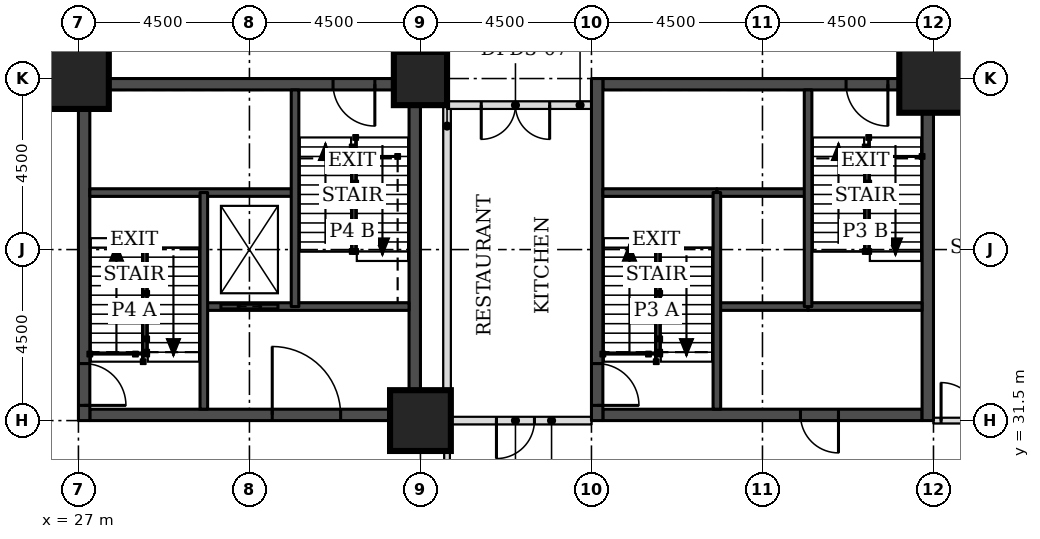
"""IFC4 building model, lengths in metres.
Left out: names, types, materials, properties, quantities, classifications, styles, units other than length and angle.
Written with IfcOpenShell. Run it as: python <this file> out.ifc"""

import sys

from ifc_helpers import new_model, si_unit, direction, frame, frame_2d, origin, origin_2d, place, context, subcontext, project, spatial, rectangle, extrude, element, fill, save


model = new_model("IFC4")
c1 = context("Model", 3, precision=1e-05, world=origin(), true_north=direction((0.0, 1.0)))
c2 = subcontext(c1, "Body", "Model", "MODEL_VIEW")
j1 = project(units=[si_unit("LENGTHUNIT", "METRE"), si_unit("PLANEANGLEUNIT", "RADIAN")], contexts=[c1])
p1 = place(None, origin())
s1 = spatial("IfcSite", under=j1, at=p1, CompositionType="ELEMENT")
p2 = place(p1, origin())
s2 = spatial("IfcBuilding", under=s1, at=p2, CompositionType="ELEMENT")
p3 = place(p2, frame((0.0, 0.0, 18.5)))
s3 = spatial("IfcBuildingStorey", under=s2, at=p3, CompositionType="ELEMENT", Elevation=18.5)
for number, where, z_axis, x_axis in (
    (1, (36.0, 31.5, 0.0), (0.0, 0.0, 1.0), (1.0, 0.0, 0.0)),
    (2, (27.0, 40.5, 0.0), (0.0, 0.0, 1.0), (1.0, 0.0, 0.0)),
):
    element("IfcColumn", number, at=place(p3, frame(where, z_axis=z_axis, x_axis=x_axis)), inside=s3, PredefinedType="COLUMN", context=c2, shape_type="SweptSolid", body=[
        extrude(rectangle(XDim=1.6, YDim=1.6, at=origin_2d()), origin(), (0.0, 0.0, 1.0), 4.6),
    ])
p4 = place(p3, frame((36.0, 40.5, 0.0), z_axis=(0.0, 0.0, 1.0), x_axis=(1.0, 0.0, 0.0)))
e3 = element("IfcColumn", 3, at=p4, inside=s3, PredefinedType="COLUMN", context=c2, shape_type="SweptSolid", body=[
    extrude(rectangle(XDim=1.4, YDim=1.4, at=origin_2d()), origin(), (0.0, 0.0, 1.0), 4.6),
])
p5 = place(p3, frame((49.5, 40.5, 0.0), z_axis=(0.0, 0.0, 1.0), x_axis=(1.0, 0.0, 0.0)))
e4 = element("IfcColumn", 4, at=p5, inside=s3, PredefinedType="COLUMN", context=c2, shape_type="SweptSolid", body=[
    extrude(rectangle(XDim=1.8, YDim=1.8, at=origin_2d()), origin(), (0.0, 0.0, 1.0), 4.6),
])
p6 = place(p3, frame((40.8, 31.65, 0.0), z_axis=(0.0, 0.0, 1.0), x_axis=(1.0, 0.0, 0.0)))
e5 = element("IfcWall", 5, at=p6, inside=s3, PredefinedType="SHEAR", context=c2, shape_type="SweptSolid", body=[
    extrude(rectangle(XDim=8.4, YDim=0.3, at=frame_2d((4.2, 0.0))), origin(), (0.0, 0.0, 1.0), 4.6),
])
p7 = place(p6, frame((5.2, 0.0, 0.0)))
e6 = element("IfcOpeningElement", 6, at=p7, cuts=e5, PredefinedType="OPENING", context=c2, shape_type="SweptSolid", body=[
    extrude(rectangle(XDim=1.0, YDim=2.1, at=frame_2d((0.5, 1.05))), frame((0.0, 0.16, 0.0), z_axis=(0.0, -1.0, 0.0), x_axis=(1.0, 0.0, 0.0)), (0.0, 0.0, 1.0), 0.32),
])
p8 = place(p3, frame((40.8, 40.35, 0.0), z_axis=(0.0, 0.0, 1.0), x_axis=(1.0, 0.0, 0.0)))
e7 = element("IfcWall", 7, at=p8, inside=s3, PredefinedType="SHEAR", context=c2, shape_type="SweptSolid", body=[
    extrude(rectangle(XDim=8.4, YDim=0.3, at=frame_2d((4.2, 0.0))), origin(), (0.0, 0.0, 1.0), 4.6),
])
p9 = place(p8, frame((6.4, 0.0, 0.0)))
e8 = element("IfcOpeningElement", 8, at=p9, cuts=e7, PredefinedType="OPENING", context=c2, shape_type="SweptSolid", body=[
    extrude(rectangle(XDim=1.1, YDim=2.1, at=frame_2d((0.55, 1.05))), frame((0.0, 0.16, 0.0), z_axis=(0.0, -1.0, 0.0), x_axis=(1.0, 0.0, 0.0)), (0.0, 0.0, 1.0), 0.32),
])
p10 = place(p3, frame((40.65, 31.5, 0.0), z_axis=(0.0, 0.0, 1.0), x_axis=(0.0, 1.0, 0.0)))
e9 = element("IfcWall", 9, at=p10, inside=s3, PredefinedType="SHEAR", context=c2, shape_type="SweptSolid", body=[
    extrude(rectangle(XDim=9.0, YDim=0.3, at=frame_2d((4.5, 0.0))), origin(), (0.0, 0.0, 1.0), 4.6),
])
p11 = place(p10, frame((0.4, 0.0, 0.0)))
e10 = element("IfcOpeningElement", 10, at=p11, cuts=e9, PredefinedType="OPENING", context=c2, shape_type="SweptSolid", body=[
    extrude(rectangle(XDim=1.1, YDim=2.1, at=frame_2d((0.55, 1.05))), frame((0.0, 0.16, 0.0), z_axis=(0.0, -1.0, 0.0), x_axis=(1.0, 0.0, 0.0)), (0.0, 0.0, 1.0), 0.32),
])
p12 = place(p3, frame((49.35, 31.5, 0.0), z_axis=(0.0, 0.0, 1.0), x_axis=(0.0, 1.0, 0.0)))
e11 = element("IfcWall", 11, at=p12, inside=s3, PredefinedType="SHEAR", context=c2, shape_type="SweptSolid", body=[
    extrude(rectangle(XDim=9.0, YDim=0.3, at=frame_2d((4.5, 0.0))), origin(), (0.0, 0.0, 1.0), 4.6),
])
p13 = place(p3, frame((27.3, 31.65, 0.0), z_axis=(0.0, 0.0, 1.0), x_axis=(1.0, 0.0, 0.0)))
e12 = element("IfcWall", 12, at=p13, inside=s3, PredefinedType="SHEAR", context=c2, shape_type="SweptSolid", body=[
    extrude(rectangle(XDim=8.4, YDim=0.3, at=frame_2d((4.2, 0.0))), origin(), (0.0, 0.0, 1.0), 4.6),
])
p14 = place(p13, frame((4.8, 0.0, 0.0)))
e13 = element("IfcOpeningElement", 13, at=p14, cuts=e12, PredefinedType="OPENING", context=c2, shape_type="SweptSolid", body=[
    extrude(rectangle(XDim=1.8, YDim=2.1, at=frame_2d((0.9, 1.05))), frame((0.0, 0.16, 0.0), z_axis=(0.0, -1.0, 0.0), x_axis=(1.0, 0.0, 0.0)), (0.0, 0.0, 1.0), 0.32),
])
p15 = place(p3, frame((27.3, 40.35, 0.0), z_axis=(0.0, 0.0, 1.0), x_axis=(1.0, 0.0, 0.0)))
e14 = element("IfcWall", 14, at=p15, inside=s3, PredefinedType="SHEAR", context=c2, shape_type="SweptSolid", body=[
    extrude(rectangle(XDim=8.4, YDim=0.3, at=frame_2d((4.2, 0.0))), origin(), (0.0, 0.0, 1.0), 4.6),
])
p16 = place(p15, frame((6.4, 0.0, 0.0)))
e15 = element("IfcOpeningElement", 15, at=p16, cuts=e14, PredefinedType="OPENING", context=c2, shape_type="SweptSolid", body=[
    extrude(rectangle(XDim=1.1, YDim=2.1, at=frame_2d((0.55, 1.05))), frame((0.0, 0.16, 0.0), z_axis=(0.0, -1.0, 0.0), x_axis=(1.0, 0.0, 0.0)), (0.0, 0.0, 1.0), 0.32),
])
p17 = place(p3, frame((27.15, 31.5, 0.0), z_axis=(0.0, 0.0, 1.0), x_axis=(0.0, 1.0, 0.0)))
e16 = element("IfcWall", 16, at=p17, inside=s3, PredefinedType="SHEAR", context=c2, shape_type="SweptSolid", body=[
    extrude(rectangle(XDim=9.0, YDim=0.3, at=frame_2d((4.5, 0.0))), origin(), (0.0, 0.0, 1.0), 4.6),
])
p18 = place(p17, frame((0.4, 0.0, 0.0)))
e17 = element("IfcOpeningElement", 17, at=p18, cuts=e16, PredefinedType="OPENING", context=c2, shape_type="SweptSolid", body=[
    extrude(rectangle(XDim=1.1, YDim=2.1, at=frame_2d((0.55, 1.05))), frame((0.0, 0.16, 0.0), z_axis=(0.0, -1.0, 0.0), x_axis=(1.0, 0.0, 0.0)), (0.0, 0.0, 1.0), 0.32),
])
p19 = place(p3, frame((35.85, 31.5, 0.0), z_axis=(0.0, 0.0, 1.0), x_axis=(0.0, 1.0, 0.0)))
e18 = element("IfcWall", 18, at=p19, inside=s3, PredefinedType="SHEAR", context=c2, shape_type="SweptSolid", body=[
    extrude(rectangle(XDim=9.0, YDim=0.3, at=frame_2d((4.5, 0.0))), origin(), (0.0, 0.0, 1.0), 4.6),
])
p20 = place(p3, frame((36.7, 17.4, 0.0), z_axis=(0.0, 0.0, 1.0), x_axis=(0.0, 1.0, 0.0)))
e19 = element("IfcWall", 19, at=p20, inside=s3, PredefinedType="PARTITIONING", context=c2, shape_type="SweptSolid", body=[
    extrude(rectangle(XDim=13.3, YDim=0.15, at=frame_2d((6.65, 0.0))), origin(), (0.0, 0.0, 1.0), 4.38),
])
p21 = place(p3, frame((36.8, 31.5, 0.0), z_axis=(0.0, 0.0, 1.0), x_axis=(1.0, 0.0, 0.0)))
e20 = element("IfcWall", 20, at=p21, inside=s3, PredefinedType="PARTITIONING", context=c2, shape_type="SweptSolid", body=[
    extrude(rectangle(XDim=3.7, YDim=0.2, at=frame_2d((1.85, 0.0))), origin(), (0.0, 0.0, 1.0), 4.38),
])
p22 = place(p21, frame((1.2, 0.0, 0.0)))
e21 = element("IfcOpeningElement", 21, at=p22, cuts=e20, PredefinedType="OPENING", context=c2, shape_type="SweptSolid", body=[
    extrude(rectangle(XDim=1.0, YDim=2.1, at=frame_2d((0.5, 1.05))), frame((0.0, 0.11, 0.0), z_axis=(0.0, -1.0, 0.0), x_axis=(1.0, 0.0, 0.0)), (0.0, 0.0, 1.0), 0.22),
])
p23 = place(p3, frame((36.7, 32.3, 0.0), z_axis=(0.0, 0.0, 1.0), x_axis=(0.0, 1.0, 0.0)))
e22 = element("IfcWall", 22, at=p23, inside=s3, PredefinedType="PARTITIONING", context=c2, shape_type="SweptSolid", body=[
    extrude(rectangle(XDim=7.5, YDim=0.2, at=frame_2d((3.75, 0.0))), origin(), (0.0, 0.0, 1.0), 4.38),
])
p24 = place(p3, frame((49.5, 31.5, 0.0), z_axis=(0.0, 0.0, 1.0), x_axis=(1.0, 0.0, 0.0)))
e23 = element("IfcWall", 23, at=p24, inside=s3, PredefinedType="PARTITIONING", context=c2, shape_type="SweptSolid", body=[
    extrude(rectangle(XDim=8.0, YDim=0.15, at=frame_2d((4.0, 0.0))), origin(), (0.0, 0.0, 1.0), 4.38),
])
p25 = place(p24, frame((0.2, 0.0, 0.0)))
e24 = element("IfcOpeningElement", 24, at=p25, cuts=e23, PredefinedType="OPENING", context=c2, shape_type="SweptSolid", body=[
    extrude(rectangle(XDim=2.0, YDim=2.1, at=frame_2d((1.0, 1.05))), frame((0.0, 0.085, 0.0), z_axis=(0.0, -1.0, 0.0), x_axis=(1.0, 0.0, 0.0)), (0.0, 0.0, 1.0), 0.17),
])
p26 = place(p24, frame((3.5, 0.0, 0.0)))
e25 = element("IfcOpeningElement", 25, at=p26, cuts=e23, PredefinedType="OPENING", context=c2, shape_type="SweptSolid", body=[
    extrude(rectangle(XDim=2.0, YDim=2.1, at=frame_2d((1.0, 1.05))), frame((0.0, 0.085, 0.0), z_axis=(0.0, -1.0, 0.0), x_axis=(1.0, 0.0, 0.0)), (0.0, 0.0, 1.0), 0.17),
])
p27 = place(p3, frame((36.7, 39.8, 0.0), z_axis=(0.0, 0.0, 1.0), x_axis=(1.0, 0.0, 0.0)))
e26 = element("IfcWall", 26, at=p27, inside=s3, PredefinedType="PARTITIONING", context=c2, shape_type="SweptSolid", body=[
    extrude(rectangle(XDim=3.8, YDim=0.2, at=frame_2d((1.9, 0.0))), origin(), (0.0, 0.0, 1.0), 4.38),
])
p28 = place(p27, frame((0.9, 0.0, 0.0)))
e27 = element("IfcOpeningElement", 27, at=p28, cuts=e26, PredefinedType="OPENING", context=c2, shape_type="SweptSolid", body=[
    extrude(rectangle(XDim=1.8, YDim=2.1, at=frame_2d((0.9, 1.05))), frame((0.0, 0.11, 0.0), z_axis=(0.0, -1.0, 0.0), x_axis=(1.0, 0.0, 0.0)), (0.0, 0.0, 1.0), 0.22),
])
p29 = place(p3, frame((43.8, 34.5, 0.0), z_axis=(0.0, 0.0, 1.0), x_axis=(1.0, 0.0, 0.0)))
e28 = element("IfcWall", 28, at=p29, inside=s3, PredefinedType="SOLIDWALL", context=c2, shape_type="SweptSolid", body=[
    extrude(rectangle(XDim=2.4, YDim=0.2, at=frame_2d((1.2, 0.0))), origin(), (0.0, 0.0, 1.0), 4.38),
])
p30 = place(p3, frame((46.2, 34.5, 0.0), z_axis=(0.0, 0.0, 1.0), x_axis=(1.0, 0.0, 0.0)))
e29 = element("IfcWall", 29, at=p30, inside=s3, PredefinedType="SOLIDWALL", context=c2, shape_type="SweptSolid", body=[
    extrude(rectangle(XDim=3.0, YDim=0.2, at=frame_2d((1.5, 0.0))), origin(), (0.0, 0.0, 1.0), 4.38),
])
p31 = place(p3, frame((43.8, 37.5, 0.0), z_axis=(0.0, 0.0, 1.0), x_axis=(1.0, 0.0, 0.0)))
e30 = element("IfcWall", 30, at=p31, inside=s3, PredefinedType="SOLIDWALL", context=c2, shape_type="SweptSolid", body=[
    extrude(rectangle(XDim=2.4, YDim=0.2, at=frame_2d((1.2, 0.0))), origin(), (0.0, 0.0, 1.0), 4.6),
])
p32 = place(p3, frame((40.8, 37.5, 0.0), z_axis=(0.0, 0.0, 1.0), x_axis=(1.0, 0.0, 0.0)))
e31 = element("IfcWall", 31, at=p32, inside=s3, PredefinedType="SOLIDWALL", context=c2, shape_type="SweptSolid", body=[
    extrude(rectangle(XDim=3.0, YDim=0.2, at=frame_2d((1.5, 0.0))), origin(), (0.0, 0.0, 1.0), 4.38),
])
for number, where, z_axis, x_axis in (
    (32, (43.8, 31.8, 0.0), (0.0, 0.0, 1.0), (0.0, 1.0, 0.0)),
    (33, (46.2, 34.5, 0.0), (0.0, 0.0, 1.0), (0.0, 1.0, 0.0)),
):
    element("IfcWall", number, at=place(p3, frame(where, z_axis=z_axis, x_axis=x_axis)), inside=s3, PredefinedType="SOLIDWALL", context=c2, shape_type="SweptSolid", body=[
        extrude(rectangle(XDim=5.7, YDim=0.2, at=frame_2d((2.85, 0.0))), origin(), (0.0, 0.0, 1.0), 4.38),
    ])
p33 = place(p3, frame((30.3, 34.5, 0.0), z_axis=(0.0, 0.0, 1.0), x_axis=(1.0, 0.0, 0.0)))
e34 = element("IfcWall", 34, at=p33, inside=s3, PredefinedType="SOLIDWALL", context=c2, shape_type="SweptSolid", body=[
    extrude(rectangle(XDim=5.4, YDim=0.2, at=frame_2d((2.7, 0.0))), origin(), (0.0, 0.0, 1.0), 4.38),
])
p34 = place(p33, frame((0.45, 0.0, 0.0)))
e35 = element("IfcOpeningElement", 35, at=p34, cuts=e34, PredefinedType="OPENING", context=c2, shape_type="SweptSolid", body=[
    extrude(rectangle(XDim=1.5, YDim=2.1, at=frame_2d((0.75, 1.05))), frame((0.0, 0.11, 0.0), z_axis=(0.0, -1.0, 0.0), x_axis=(1.0, 0.0, 0.0)), (0.0, 0.0, 1.0), 0.22),
])
p35 = place(p3, frame((27.3, 37.5, 0.0), z_axis=(0.0, 0.0, 1.0), x_axis=(1.0, 0.0, 0.0)))
e36 = element("IfcWall", 36, at=p35, inside=s3, PredefinedType="SOLIDWALL", context=c2, shape_type="SweptSolid", body=[
    extrude(rectangle(XDim=5.4, YDim=0.2, at=frame_2d((2.7, 0.0))), origin(), (0.0, 0.0, 1.0), 4.38),
])
for number, where, z_axis, x_axis in (
    (37, (30.3, 31.8, 0.0), (0.0, 0.0, 1.0), (0.0, 1.0, 0.0)),
    (38, (32.7, 34.5, 0.0), (0.0, 0.0, 1.0), (0.0, 1.0, 0.0)),
):
    element("IfcWall", number, at=place(p3, frame(where, z_axis=z_axis, x_axis=x_axis)), inside=s3, PredefinedType="SOLIDWALL", context=c2, shape_type="SweptSolid", body=[
        extrude(rectangle(XDim=5.7, YDim=0.2, at=frame_2d((2.85, 0.0))), origin(), (0.0, 0.0, 1.0), 4.38),
    ])
p36 = place(p25, origin())
e39 = element("IfcDoor", 39, at=p36, inside=s3, OperationType="DOUBLE_DOOR_SINGLE_SWING", PredefinedType="DOOR", context=c2, shape_type="SweptSolid", body=[
    extrude(rectangle(XDim=2.0, YDim=2.1, at=frame_2d((1.0, 1.05))), frame((0.0, 0.025, 0.0), z_axis=(0.0, -1.0, 0.0), x_axis=(1.0, 0.0, 0.0)), (0.0, 0.0, 1.0), 0.05),
])
fill(e24, e39)
p37 = place(p28, frame((1.8, 0.0, 0.0), z_axis=(0.0, 0.0, 1.0), x_axis=(-1.0, 0.0, 0.0)))
e40 = element("IfcDoor", 40, at=p37, inside=s3, OperationType="DOUBLE_DOOR_SINGLE_SWING", PredefinedType="DOOR", context=c2, shape_type="SweptSolid", body=[
    extrude(rectangle(XDim=1.8, YDim=2.1, at=frame_2d((0.9, 1.05))), frame((0.0, 0.025, 0.0), z_axis=(0.0, -1.0, 0.0), x_axis=(1.0, 0.0, 0.0)), (0.0, 0.0, 1.0), 0.05),
])
fill(e27, e40)
p38 = place(p22, frame((1.0, 0.0, 0.0), z_axis=(0.0, 0.0, 1.0), x_axis=(-1.0, 0.0, 0.0)))
e41 = element("IfcDoor", 41, at=p38, inside=s3, OperationType="SINGLE_SWING_RIGHT", PredefinedType="DOOR", context=c2, shape_type="SweptSolid", body=[
    extrude(rectangle(XDim=1.0, YDim=2.1, at=frame_2d((0.5, 1.05))), frame((0.0, 0.025, 0.0), z_axis=(0.0, -1.0, 0.0), x_axis=(1.0, 0.0, 0.0)), (0.0, 0.0, 1.0), 0.05),
])
fill(e21, e41)
p39 = place(p11, frame((1.1, 0.0, 0.0), z_axis=(0.0, 0.0, 1.0), x_axis=(-1.0, 0.0, 0.0)))
e42 = element("IfcDoor", 42, at=p39, inside=s3, OperationType="SINGLE_SWING_RIGHT", PredefinedType="DOOR", context=c2, shape_type="SweptSolid", body=[
    extrude(rectangle(XDim=1.1, YDim=2.1, at=frame_2d((0.55, 1.05))), frame((0.0, 0.025, 0.0), z_axis=(0.0, -1.0, 0.0), x_axis=(1.0, 0.0, 0.0)), (0.0, 0.0, 1.0), 0.05),
])
fill(e10, e42)
p40 = place(p9, frame((1.1, 0.0, 0.0), z_axis=(0.0, 0.0, 1.0), x_axis=(-1.0, 0.0, 0.0)))
e43 = element("IfcDoor", 43, at=p40, inside=s3, OperationType="SINGLE_SWING_LEFT", PredefinedType="DOOR", context=c2, shape_type="SweptSolid", body=[
    extrude(rectangle(XDim=1.1, YDim=2.1, at=frame_2d((0.55, 1.05))), frame((0.0, 0.025, 0.0), z_axis=(0.0, -1.0, 0.0), x_axis=(1.0, 0.0, 0.0)), (0.0, 0.0, 1.0), 0.05),
])
fill(e8, e43)
p41 = place(p7, frame((1.0, 0.0, 0.0), z_axis=(0.0, 0.0, 1.0), x_axis=(-1.0, 0.0, 0.0)))
e44 = element("IfcDoor", 44, at=p41, inside=s3, OperationType="SINGLE_SWING_LEFT", PredefinedType="DOOR", context=c2, shape_type="SweptSolid", body=[
    extrude(rectangle(XDim=1.0, YDim=2.1, at=frame_2d((0.5, 1.05))), frame((0.0, 0.025, 0.0), z_axis=(0.0, -1.0, 0.0), x_axis=(1.0, 0.0, 0.0)), (0.0, 0.0, 1.0), 0.05),
])
fill(e6, e44)
p42 = place(p18, frame((1.1, 0.0, 0.0), z_axis=(0.0, 0.0, 1.0), x_axis=(-1.0, 0.0, 0.0)))
e45 = element("IfcDoor", 45, at=p42, inside=s3, OperationType="SINGLE_SWING_RIGHT", PredefinedType="DOOR", context=c2, shape_type="SweptSolid", body=[
    extrude(rectangle(XDim=1.1, YDim=2.1, at=frame_2d((0.55, 1.05))), frame((0.0, 0.025, 0.0), z_axis=(0.0, -1.0, 0.0), x_axis=(1.0, 0.0, 0.0)), (0.0, 0.0, 1.0), 0.05),
])
fill(e17, e45)
p43 = place(p16, frame((1.1, 0.0, 0.0), z_axis=(0.0, 0.0, 1.0), x_axis=(-1.0, 0.0, 0.0)))
e46 = element("IfcDoor", 46, at=p43, inside=s3, OperationType="SINGLE_SWING_LEFT", PredefinedType="DOOR", context=c2, shape_type="SweptSolid", body=[
    extrude(rectangle(XDim=1.1, YDim=2.1, at=frame_2d((0.55, 1.05))), frame((0.0, 0.025, 0.0), z_axis=(0.0, -1.0, 0.0), x_axis=(1.0, 0.0, 0.0)), (0.0, 0.0, 1.0), 0.05),
])
fill(e15, e46)
p44 = place(p34, origin())
e47 = element("IfcDoor", 47, at=p44, inside=s3, OperationType="DOUBLE_DOOR_SLIDING", PredefinedType="DOOR", context=c2, shape_type="SweptSolid", body=[
    extrude(rectangle(XDim=1.5, YDim=2.1, at=frame_2d((0.75, 1.05))), frame((0.0, 0.025, 0.0), z_axis=(0.0, -1.0, 0.0), x_axis=(1.0, 0.0, 0.0)), (0.0, 0.0, 1.0), 0.05),
])
fill(e35, e47)
p45 = place(p14, origin())
e48 = element("IfcDoor", 48, at=p45, inside=s3, OperationType="SINGLE_SWING_LEFT", PredefinedType="DOOR", context=c2, shape_type="SweptSolid", body=[
    extrude(rectangle(XDim=1.8, YDim=2.1, at=frame_2d((0.9, 1.05))), frame((0.0, 0.025, 0.0), z_axis=(0.0, -1.0, 0.0), x_axis=(1.0, 0.0, 0.0)), (0.0, 0.0, 1.0), 0.05),
])
fill(e13, e48)
save(model, sys.argv[1])
